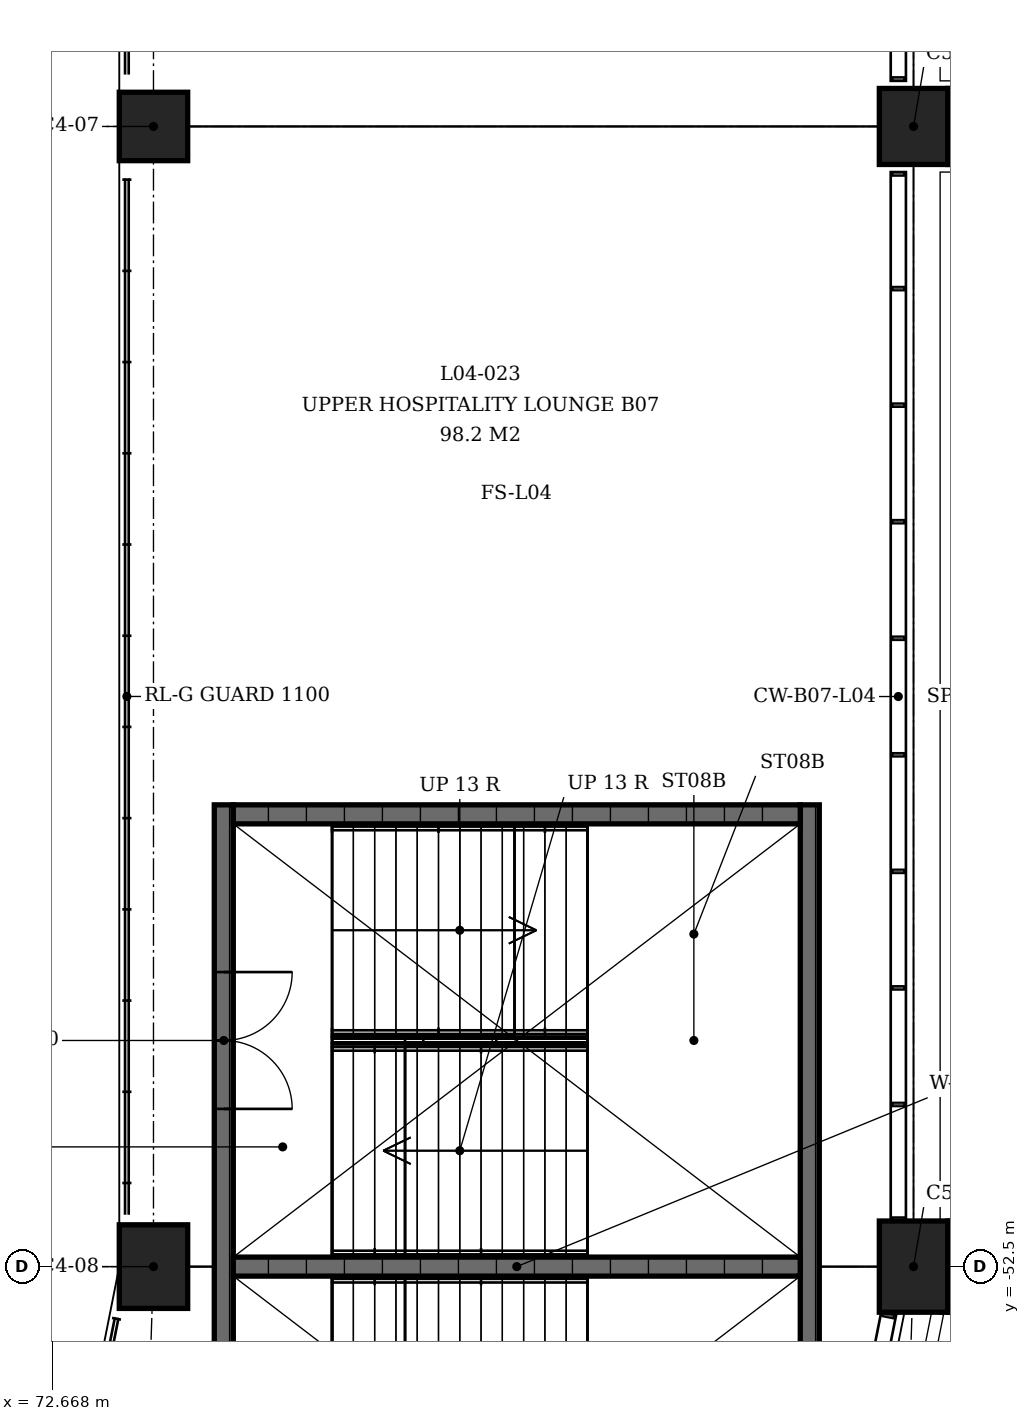
"""IFC4 building model, lengths in metres.
Left out: names, types, materials, properties, quantities, classifications, styles, units other than length and angle.
Written with IfcOpenShell. Run it as: python <this file> out.ifc"""

import sys

from ifc_helpers import new_model, si_unit, direction, frame, frame_2d, origin, origin_2d, place, context, subcontext, project, spatial, rectangle, extrude, element, fill, save


model = new_model("IFC4")
c1 = context("Model", 3, precision=1e-05, world=origin(), true_north=direction((0.0, 1.0)))
c2 = subcontext(c1, "Body", "Model", "MODEL_VIEW")
j1 = project(units=[si_unit("LENGTHUNIT", "METRE"), si_unit("PLANEANGLEUNIT", "RADIAN")], contexts=[c1])
p1 = place(None, origin())
s1 = spatial("IfcSite", under=j1, at=p1, CompositionType="ELEMENT")
p2 = place(p1, origin())
s2 = spatial("IfcBuilding", under=s1, at=p2, CompositionType="ELEMENT")
p3 = place(p2, frame((0.0, 0.0, 18.0)))
s3 = spatial("IfcBuildingStorey", under=s2, at=p3, CompositionType="ELEMENT", Elevation=18.0)
p4 = place(p3, frame((74.0, -37.5, 0.0), z_axis=(0.0, 0.0, 1.0), x_axis=(0.0, 1.0, 0.0)))
e1 = element("IfcColumn", 1, at=p4, inside=s3, PredefinedType="COLUMN", context=c2, shape_type="SweptSolid", body=[
    extrude(rectangle(XDim=0.9, YDim=0.9, at=origin_2d()), origin(), (0.0, 0.0, 1.0), 4.5),
])
p5 = place(p3, frame((84.0, -37.5, 0.0), z_axis=(0.0, 0.0, 1.0), x_axis=(0.0, 1.0, 0.0)))
e2 = element("IfcColumn", 2, at=p5, inside=s3, PredefinedType="COLUMN", context=c2, shape_type="SweptSolid", body=[
    extrude(rectangle(XDim=1.0, YDim=0.9, at=origin_2d()), origin(), (0.0, 0.0, 1.0), 4.5),
])
p6 = place(p3, frame((74.0, -52.5, 0.0), z_axis=(0.0, 0.0, 1.0), x_axis=(0.0, 1.0, 0.0)))
e3 = element("IfcColumn", 3, at=p6, inside=s3, PredefinedType="COLUMN", context=c2, shape_type="SweptSolid", body=[
    extrude(rectangle(XDim=1.1, YDim=0.9, at=origin_2d()), origin(), (0.0, 0.0, 1.0), 4.5),
])
p7 = place(p3, frame((84.0, -52.5, 0.0), z_axis=(0.0, 0.0, 1.0), x_axis=(0.0, 1.0, 0.0)))
e4 = element("IfcColumn", 4, at=p7, inside=s3, PredefinedType="COLUMN", context=c2, shape_type="SweptSolid", body=[
    extrude(rectangle(XDim=1.2, YDim=0.9, at=origin_2d()), origin(), (0.0, 0.0, 1.0), 4.5),
])
p8 = place(p3, frame((74.925, -58.575, 0.0), z_axis=(0.0, 0.0, 1.0), x_axis=(0.0, 1.0, 0.0)))
e5 = element("IfcWall", 5, at=p8, inside=s3, PredefinedType="SHEAR", context=c2, shape_type="SweptSolid", body=[
    extrude(rectangle(XDim=12.15, YDim=0.25, at=frame_2d((6.075, 0.0))), origin(), (0.0, 0.0, 1.0), 4.09),
])
p9 = place(p8, frame((2.2, 0.0, 0.0)))
e6 = element("IfcOpeningElement", 6, at=p9, cuts=e5, PredefinedType="OPENING", context=c2, shape_type="SweptSolid", body=[
    extrude(rectangle(XDim=1.8, YDim=2.1, at=frame_2d((0.9, 1.05))), frame((0.0, 0.125, 0.0), z_axis=(0.0, -1.0, 0.0), x_axis=(1.0, 0.0, 0.0)), (0.0, 0.0, 1.0), 0.25),
])
p10 = place(p8, frame((8.15, 0.0, 0.0)))
e7 = element("IfcOpeningElement", 7, at=p10, cuts=e5, PredefinedType="OPENING", context=c2, shape_type="SweptSolid", body=[
    extrude(rectangle(XDim=1.8, YDim=2.1, at=frame_2d((0.9, 1.05))), frame((0.0, 0.125, 0.0), z_axis=(0.0, -1.0, 0.0), x_axis=(1.0, 0.0, 0.0)), (0.0, 0.0, 1.0), 0.25),
])
p11 = place(p3, frame((82.635, -58.575, 0.0), z_axis=(0.0, 0.0, 1.0), x_axis=(0.0, 1.0, 0.0)))
e8 = element("IfcWall", 8, at=p11, inside=s3, PredefinedType="SHEAR", context=c2, shape_type="SweptSolid", body=[
    extrude(rectangle(XDim=12.15, YDim=0.25, at=frame_2d((6.075, 0.0))), origin(), (0.0, 0.0, 1.0), 4.09),
])
for number, where, z_axis, x_axis in (
    (9, (75.05, -46.55, 0.0), (0.0, 0.0, 1.0), (1.0, 0.0, 0.0)),
    (10, (75.05, -52.5, 0.0), (0.0, 0.0, 1.0), (1.0, 0.0, 0.0)),
):
    element("IfcWall", number, at=place(p3, frame(where, z_axis=z_axis, x_axis=x_axis)), inside=s3, PredefinedType="SHEAR", context=c2, shape_type="SweptSolid", body=[
        extrude(rectangle(XDim=7.46, YDim=0.25, at=frame_2d((3.73, 0.0))), origin(), (0.0, 0.0, 1.0), 4.09),
    ])
p12 = place(p10, origin())
e11 = element("IfcDoor", 11, at=p12, inside=s3, OperationType="DOUBLE_DOOR_SINGLE_SWING", PredefinedType="DOOR", context=c2, shape_type="SweptSolid", body=[
    extrude(rectangle(XDim=1.8, YDim=2.1, at=frame_2d((0.9, 1.05))), frame((0.0, 0.025, 0.0), z_axis=(0.0, -1.0, 0.0), x_axis=(1.0, 0.0, 0.0)), (0.0, 0.0, 1.0), 0.05),
])
fill(e7, e11)
save(model, sys.argv[1])
